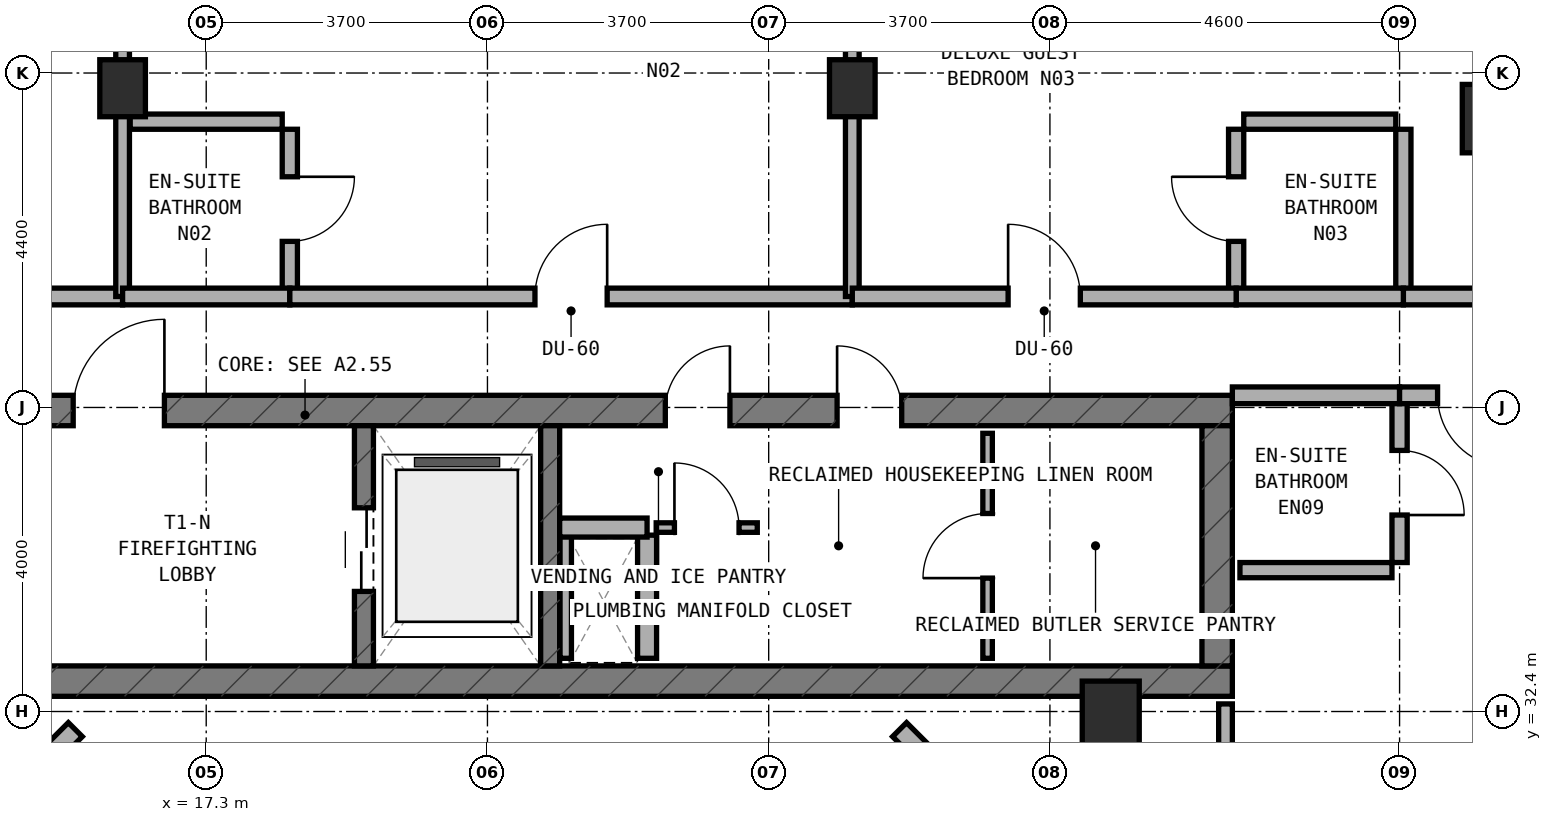
"""IFC4 building model, lengths in metres.
Left out: names, types, materials, properties, quantities, classifications, styles, units other than length and angle.
Written with IfcOpenShell. Run it as: python <this file> out.ifc"""

import sys

from ifc_helpers import new_model, si_unit, direction, frame, frame_2d, origin, origin_2d, place, context, subcontext, project, spatial, rectangle, extrude, element, fill, save


model = new_model("IFC4")
c1 = context("Model", 3, precision=1e-05, world=origin(), true_north=direction((0.0, 1.0)))
c2 = subcontext(c1, "Body", "Model", "MODEL_VIEW")
j1 = project(units=[si_unit("LENGTHUNIT", "METRE"), si_unit("PLANEANGLEUNIT", "RADIAN")], contexts=[c1])
p1 = place(None, origin())
s1 = spatial("IfcSite", under=j1, at=p1, CompositionType="ELEMENT")
p2 = place(p1, origin())
s2 = spatial("IfcBuilding", under=s1, at=p2, CompositionType="ELEMENT")
p3 = place(p2, frame((0.0, 0.0, 254.0)))
s3 = spatial("IfcBuildingStorey", under=s2, at=p3, CompositionType="ELEMENT", Elevation=254.0)
p4 = place(p3, frame((6.4, 32.8, 0.0), z_axis=(0.0, 0.0, 1.0), x_axis=(1.0, 0.0, 0.0)))
e1 = element("IfcWall", 1, at=p4, inside=s3, PredefinedType="SHEAR", context=c2, shape_type="SweptSolid", body=[
    extrude(rectangle(XDim=24.4, YDim=0.4, at=frame_2d((12.2, 0.0))), origin(), (0.0, 0.0, 1.0), 3.6),
])
p5 = place(p4, frame((6.05, 0.0, 0.0)))
e2 = element("IfcOpeningElement", 2, at=p5, cuts=e1, PredefinedType="OPENING", context=c2, shape_type="SweptSolid", body=[
    extrude(rectangle(XDim=1.1, YDim=2.15, at=frame_2d((0.55, 1.075))), frame((0.0, 0.21, 0.0), z_axis=(0.0, -1.0, 0.0), x_axis=(1.0, 0.0, 0.0)), (0.0, 0.0, 1.0), 0.42),
])
p6 = place(p3, frame((6.4, 36.36, 0.0), z_axis=(0.0, 0.0, 1.0), x_axis=(1.0, 0.0, 0.0)))
e3 = element("IfcWall", 3, at=p6, inside=s3, PredefinedType="SHEAR", context=c2, shape_type="SweptSolid", body=[
    extrude(rectangle(XDim=24.4, YDim=0.4, at=frame_2d((12.2, 0.0))), origin(), (0.0, 0.0, 1.0), 3.6),
])
p7 = place(p6, frame((9.15, 0.0, 0.0)))
e4 = element("IfcOpeningElement", 4, at=p7, cuts=e3, PredefinedType="OPENING", context=c2, shape_type="SweptSolid", body=[
    extrude(rectangle(XDim=1.2, YDim=2.15, at=frame_2d((0.6, 1.075))), frame((0.0, 0.21, 0.0), z_axis=(0.0, -1.0, 0.0), x_axis=(1.0, 0.0, 0.0)), (0.0, 0.0, 1.0), 0.42),
])
p8 = place(p6, frame((19.2, 0.0, 0.0)))
e5 = element("IfcOpeningElement", 5, at=p8, cuts=e3, PredefinedType="OPENING", context=c2, shape_type="SweptSolid", body=[
    extrude(rectangle(XDim=0.85, YDim=2.1, at=frame_2d((0.425, 1.05))), frame((0.0, 0.21, 0.0), z_axis=(0.0, -1.0, 0.0), x_axis=(1.0, 0.0, 0.0)), (0.0, 0.0, 1.0), 0.42),
])
p9 = place(p6, frame((16.94, 0.0, 0.0)))
e6 = element("IfcOpeningElement", 6, at=p9, cuts=e3, PredefinedType="OPENING", context=c2, shape_type="SweptSolid", body=[
    extrude(rectangle(XDim=0.85, YDim=2.1, at=frame_2d((0.425, 1.05))), frame((0.0, 0.21, 0.0), z_axis=(0.0, -1.0, 0.0), x_axis=(1.0, 0.0, 0.0)), (0.0, 0.0, 1.0), 0.42),
])
p10 = place(p3, frame((30.6, 33.0, 0.0), z_axis=(0.0, 0.0, 1.0), x_axis=(0.0, 1.0, 0.0)))
e7 = element("IfcWall", 7, at=p10, inside=s3, PredefinedType="SHEAR", context=c2, shape_type="SweptSolid", body=[
    extrude(rectangle(XDim=3.16, YDim=0.4, at=frame_2d((1.58, 0.0))), origin(), (0.0, 0.0, 1.0), 3.6),
])
p11 = place(p3, frame((19.375, 33.0, 0.0), z_axis=(0.0, 0.0, 1.0), x_axis=(0.0, 1.0, 0.0)))
e8 = element("IfcWall", 8, at=p11, inside=s3, PredefinedType="STANDARD", context=c2, shape_type="SweptSolid", body=[
    extrude(rectangle(XDim=3.16, YDim=0.25, at=frame_2d((1.58, 0.0))), origin(), (0.0, 0.0, 1.0), 3.32),
])
p12 = place(p11, frame((0.98, 0.0, 0.0)))
e9 = element("IfcOpeningElement", 9, at=p12, cuts=e8, PredefinedType="OPENING", context=c2, shape_type="SweptSolid", body=[
    extrude(rectangle(XDim=1.1, YDim=2.15, at=frame_2d((0.55, 1.075))), frame((0.0, 0.135, 0.0), z_axis=(0.0, -1.0, 0.0), x_axis=(1.0, 0.0, 0.0)), (0.0, 0.0, 1.0), 0.27),
])
p13 = place(p3, frame((21.825, 33.0, 0.0), z_axis=(0.0, 0.0, 1.0), x_axis=(0.0, 1.0, 0.0)))
e10 = element("IfcWall", 10, at=p13, inside=s3, PredefinedType="STANDARD", context=c2, shape_type="SweptSolid", body=[
    extrude(rectangle(XDim=3.16, YDim=0.25, at=frame_2d((1.58, 0.0))), origin(), (0.0, 0.0, 1.0), 3.32),
])
for number, where, z_axis, x_axis in (
    (11, (16.2, 40.6, 0.0), (0.0, 0.0, 1.0), (1.0, 0.0, 0.0)),
    (12, (25.8, 40.6, 0.0), (0.0, 0.0, 1.0), (1.0, 0.0, 0.0)),
):
    element("IfcColumn", number, at=place(p3, frame(where, z_axis=z_axis, x_axis=x_axis)), inside=s3, PredefinedType="COLUMN", context=c2, shape_type="SweptSolid", body=[
        extrude(rectangle(XDim=0.6, YDim=0.75, at=origin_2d()), origin(), (0.0, 0.0, 1.0), 3.6),
    ])
for number, where, z_axis, x_axis in (
    (13, (34.2, 40.2, 0.0), (0.0, 0.0, 1.0), (1.0, 0.0, 0.0)),
    (14, (29.2, 32.35, 0.0), (0.0, 0.0, 1.0), (1.0, 0.0, 0.0)),
):
    element("IfcColumn", number, at=place(p3, frame(where, z_axis=z_axis, x_axis=x_axis)), inside=s3, PredefinedType="COLUMN", context=c2, shape_type="SweptSolid", body=[
        extrude(rectangle(XDim=0.75, YDim=0.9, at=origin_2d()), origin(), (0.0, 0.0, 1.0), 3.6),
    ])
for number, where, z_axis, x_axis in (
    (15, (28.056, 30.528, 0.0), (0.0, 0.0, 1.0), (-0.707, 0.707, 0.0)),
    (16, (15.578, 32.162, 0.0), (0.0, 0.0, 1.0), (-0.707, -0.707, 0.0)),
):
    element("IfcWall", number, at=place(p3, frame(where, z_axis=z_axis, x_axis=x_axis)), inside=s3, PredefinedType="STANDARD", context=c2, shape_type="SweptSolid", body=[
        extrude(rectangle(XDim=2.311, YDim=0.26, at=frame_2d((1.155, 0.0))), origin(), (0.0, 0.0, 1.0), 3.32),
    ])
p14 = place(p3, frame((27.58, 33.1, 0.0), z_axis=(0.0, 0.0, 1.0), x_axis=(0.0, 1.0, 0.0)))
e17 = element("IfcWall", 17, at=p14, inside=s3, PredefinedType="PARTITIONING", context=c2, shape_type="SweptSolid", body=[
    extrude(rectangle(XDim=2.96, YDim=0.125, at=frame_2d((1.48, 0.0))), origin(), (0.0, 0.0, 1.0), 3.32),
])
p15 = place(p14, frame((1.055, 0.0, 0.0)))
e18 = element("IfcOpeningElement", 18, at=p15, cuts=e17, PredefinedType="OPENING", context=c2, shape_type="SweptSolid", body=[
    extrude(rectangle(XDim=0.85, YDim=2.1, at=frame_2d((0.425, 1.05))), frame((0.0, 0.073, 0.0), z_axis=(0.0, -1.0, 0.0), x_axis=(1.0, 0.0, 0.0)), (0.0, 0.0, 1.0), 0.145),
])
p16 = place(p3, frame((22.03, 33.1, 0.0), z_axis=(0.0, 0.0, 1.0), x_axis=(0.0, 1.0, 0.0)))
e19 = element("IfcWall", 19, at=p16, inside=s3, PredefinedType="PARTITIONING", context=c2, shape_type="SweptSolid", body=[
    extrude(rectangle(XDim=1.62, YDim=0.15, at=frame_2d((0.81, 0.0))), origin(), (0.0, 0.0, 1.0), 3.32),
])
p17 = place(p3, frame((23.1, 33.1, 0.0), z_axis=(0.0, 0.0, 1.0), x_axis=(0.0, 1.0, 0.0)))
e20 = element("IfcWall", 20, at=p17, inside=s3, PredefinedType="SOLIDWALL", context=c2, shape_type="SweptSolid", body=[
    extrude(rectangle(XDim=1.62, YDim=0.25, at=frame_2d((0.81, 0.0))), origin(), (0.0, 0.0, 1.0), 3.32),
])
p18 = place(p3, frame((21.95, 34.82, 0.0), z_axis=(0.0, 0.0, 1.0), x_axis=(1.0, 0.0, 0.0)))
e21 = element("IfcWall", 21, at=p18, inside=s3, PredefinedType="SOLIDWALL", context=c2, shape_type="SweptSolid", body=[
    extrude(rectangle(XDim=1.15, YDim=0.25, at=frame_2d((0.575, 0.0))), origin(), (0.0, 0.0, 1.0), 3.32),
])
p19 = place(p3, frame((23.22, 34.82, 0.0), z_axis=(0.0, 0.0, 1.0), x_axis=(1.0, 0.0, 0.0)))
e22 = element("IfcWall", 22, at=p19, inside=s3, PredefinedType="PARTITIONING", context=c2, shape_type="SweptSolid", body=[
    extrude(rectangle(XDim=1.33, YDim=0.125, at=frame_2d((0.665, 0.0))), origin(), (0.0, 0.0, 1.0), 3.32),
])
p20 = place(p19, frame((0.24, 0.0, 0.0)))
e23 = element("IfcOpeningElement", 23, at=p20, cuts=e22, PredefinedType="OPENING", context=c2, shape_type="SweptSolid", body=[
    extrude(rectangle(XDim=0.85, YDim=2.1, at=frame_2d((0.425, 1.05))), frame((0.0, 0.073, 0.0), z_axis=(0.0, -1.0, 0.0), x_axis=(1.0, 0.0, 0.0)), (0.0, 0.0, 1.0), 0.145),
])
p21 = place(p3, frame((11.15, 37.86, 0.0), z_axis=(0.0, 0.0, 1.0), x_axis=(1.0, 0.0, 0.0)))
e24 = element("IfcWall", 24, at=p21, inside=s3, PredefinedType="SOLIDWALL", context=c2, shape_type="SweptSolid", body=[
    extrude(rectangle(XDim=5.05, YDim=0.22, at=frame_2d((2.525, 0.0))), origin(), (0.0, 0.0, 1.0), 2.745),
])
p22 = place(p21, frame((2.05, 0.0, 0.0)))
e25 = element("IfcOpeningElement", 25, at=p22, cuts=e24, PredefinedType="OPENING", context=c2, shape_type="SweptSolid", body=[
    extrude(rectangle(XDim=0.95, YDim=2.1, at=frame_2d((0.475, 1.05))), frame((0.0, 0.12, 0.0), z_axis=(0.0, -1.0, 0.0), x_axis=(1.0, 0.0, 0.0)), (0.0, 0.0, 1.0), 0.24),
])
p23 = place(p3, frame((16.2, 37.86, 0.0), z_axis=(0.0, 0.0, 1.0), x_axis=(0.0, 1.0, 0.0)))
e26 = element("IfcWall", 26, at=p23, inside=s3, PredefinedType="SOLIDWALL", context=c2, shape_type="SweptSolid", body=[
    extrude(rectangle(XDim=5.28, YDim=0.18, at=frame_2d((2.64, 0.0))), origin(), (0.0, 0.0, 1.0), 2.745),
])
p24 = place(p3, frame((18.4, 37.96, 0.0), z_axis=(0.0, 0.0, 1.0), x_axis=(0.0, 1.0, 0.0)))
e27 = element("IfcWall", 27, at=p24, inside=s3, PredefinedType="PLUMBINGWALL", context=c2, shape_type="SweptSolid", body=[
    extrude(rectangle(XDim=2.1, YDim=0.2, at=frame_2d((1.05, 0.0))), origin(), (0.0, 0.0, 1.0), 2.845),
])
p25 = place(p24, frame((0.625, 0.0, 0.0)))
e28 = element("IfcOpeningElement", 28, at=p25, cuts=e27, PredefinedType="OPENING", context=c2, shape_type="SweptSolid", body=[
    extrude(rectangle(XDim=0.85, YDim=2.1, at=frame_2d((0.425, 1.05))), frame((0.0, 0.11, 0.0), z_axis=(0.0, -1.0, 0.0), x_axis=(1.0, 0.0, 0.0)), (0.0, 0.0, 1.0), 0.22),
])
p26 = place(p3, frame((16.3, 40.16, 0.0), z_axis=(0.0, 0.0, 1.0), x_axis=(1.0, 0.0, 0.0)))
e29 = element("IfcWall", 29, at=p26, inside=s3, PredefinedType="PLUMBINGWALL", context=c2, shape_type="SweptSolid", body=[
    extrude(rectangle(XDim=2.0, YDim=0.2, at=frame_2d((1.0, 0.0))), origin(), (0.0, 0.0, 1.0), 3.32),
])
p27 = place(p3, frame((16.2, 37.86, 0.0), z_axis=(0.0, 0.0, 1.0), x_axis=(1.0, 0.0, 0.0)))
e30 = element("IfcWall", 30, at=p27, inside=s3, PredefinedType="SOLIDWALL", context=c2, shape_type="SweptSolid", body=[
    extrude(rectangle(XDim=2.2, YDim=0.22, at=frame_2d((1.1, 0.0))), origin(), (0.0, 0.0, 1.0), 2.745),
])
p28 = place(p3, frame((18.4, 37.86, 0.0), z_axis=(0.0, 0.0, 1.0), x_axis=(1.0, 0.0, 0.0)))
e31 = element("IfcWall", 31, at=p28, inside=s3, PredefinedType="SOLIDWALL", context=c2, shape_type="SweptSolid", body=[
    extrude(rectangle(XDim=7.4, YDim=0.22, at=frame_2d((3.7, 0.0))), origin(), (0.0, 0.0, 1.0), 2.745),
])
p29 = place(p28, frame((3.225, 0.0, 0.0)))
e32 = element("IfcOpeningElement", 32, at=p29, cuts=e31, PredefinedType="OPENING", context=c2, shape_type="SweptSolid", body=[
    extrude(rectangle(XDim=0.95, YDim=2.1, at=frame_2d((0.475, 1.05))), frame((0.0, 0.12, 0.0), z_axis=(0.0, -1.0, 0.0), x_axis=(1.0, 0.0, 0.0)), (0.0, 0.0, 1.0), 0.24),
])
p30 = place(p3, frame((25.8, 37.86, 0.0), z_axis=(0.0, 0.0, 1.0), x_axis=(0.0, 1.0, 0.0)))
e33 = element("IfcWall", 33, at=p30, inside=s3, PredefinedType="SOLIDWALL", context=c2, shape_type="SweptSolid", body=[
    extrude(rectangle(XDim=5.28, YDim=0.18, at=frame_2d((2.64, 0.0))), origin(), (0.0, 0.0, 1.0), 2.745),
])
p31 = place(p3, frame((30.85, 37.96, 0.0), z_axis=(0.0, 0.0, 1.0), x_axis=(0.0, 1.0, 0.0)))
e34 = element("IfcWall", 34, at=p31, inside=s3, PredefinedType="PLUMBINGWALL", context=c2, shape_type="SweptSolid", body=[
    extrude(rectangle(XDim=2.1, YDim=0.2, at=frame_2d((1.05, 0.0))), origin(), (0.0, 0.0, 1.0), 2.845),
])
p32 = place(p31, frame((0.625, 0.0, 0.0)))
e35 = element("IfcOpeningElement", 35, at=p32, cuts=e34, PredefinedType="OPENING", context=c2, shape_type="SweptSolid", body=[
    extrude(rectangle(XDim=0.85, YDim=2.1, at=frame_2d((0.425, 1.05))), frame((0.0, 0.11, 0.0), z_axis=(0.0, -1.0, 0.0), x_axis=(1.0, 0.0, 0.0)), (0.0, 0.0, 1.0), 0.22),
])
p33 = place(p3, frame((30.95, 40.16, 0.0), z_axis=(0.0, 0.0, 1.0), x_axis=(1.0, 0.0, 0.0)))
e36 = element("IfcWall", 36, at=p33, inside=s3, PredefinedType="PLUMBINGWALL", context=c2, shape_type="SweptSolid", body=[
    extrude(rectangle(XDim=2.0, YDim=0.2, at=frame_2d((1.0, 0.0))), origin(), (0.0, 0.0, 1.0), 3.015),
])
p34 = place(p3, frame((33.05, 37.96, 0.0), z_axis=(0.0, 0.0, 1.0), x_axis=(0.0, 1.0, 0.0)))
e37 = element("IfcWall", 37, at=p34, inside=s3, PredefinedType="PLUMBINGWALL", context=c2, shape_type="SweptSolid", body=[
    extrude(rectangle(XDim=2.1, YDim=0.2, at=frame_2d((1.05, 0.0))), origin(), (0.0, 0.0, 1.0), 2.845),
])
p35 = place(p3, frame((33.05, 37.86, 0.0), z_axis=(0.0, 0.0, 1.0), x_axis=(1.0, 0.0, 0.0)))
e38 = element("IfcWall", 38, at=p35, inside=s3, PredefinedType="SOLIDWALL", context=c2, shape_type="SweptSolid", body=[
    extrude(rectangle(XDim=5.59, YDim=0.22, at=frame_2d((2.795, 0.0))), origin(), (0.0, 0.0, 1.0), 2.745),
])
p36 = place(p3, frame((30.85, 37.86, 0.0), z_axis=(0.0, 0.0, 1.0), x_axis=(1.0, 0.0, 0.0)))
e39 = element("IfcWall", 39, at=p36, inside=s3, PredefinedType="SOLIDWALL", context=c2, shape_type="SweptSolid", body=[
    extrude(rectangle(XDim=2.2, YDim=0.22, at=frame_2d((1.1, 0.0))), origin(), (0.0, 0.0, 1.0), 3.32),
])
p37 = place(p3, frame((25.8, 37.86, 0.0), z_axis=(0.0, 0.0, 1.0), x_axis=(1.0, 0.0, 0.0)))
e40 = element("IfcWall", 40, at=p37, inside=s3, PredefinedType="SOLIDWALL", context=c2, shape_type="SweptSolid", body=[
    extrude(rectangle(XDim=5.05, YDim=0.22, at=frame_2d((2.525, 0.0))), origin(), (0.0, 0.0, 1.0), 2.745),
])
p38 = place(p37, frame((2.05, 0.0, 0.0)))
e41 = element("IfcOpeningElement", 41, at=p38, cuts=e40, PredefinedType="OPENING", context=c2, shape_type="SweptSolid", body=[
    extrude(rectangle(XDim=0.95, YDim=2.1, at=frame_2d((0.475, 1.05))), frame((0.0, 0.12, 0.0), z_axis=(0.0, -1.0, 0.0), x_axis=(1.0, 0.0, 0.0)), (0.0, 0.0, 1.0), 0.24),
])
p39 = place(p3, frame((30.71, 17.5, 0.0), z_axis=(0.0, 0.0, 1.0), x_axis=(0.0, 1.0, 0.0)))
e42 = element("IfcWall", 42, at=p39, inside=s3, PredefinedType="SOLIDWALL", context=c2, shape_type="SweptSolid", body=[
    extrude(rectangle(XDim=15.0, YDim=0.18, at=frame_2d((7.5, 0.0))), origin(), (0.0, 0.0, 1.0), 2.745),
])
p40 = place(p3, frame((33.0, 34.36, 0.0), z_axis=(0.0, 0.0, 1.0), x_axis=(0.0, 1.0, 0.0)))
e43 = element("IfcWall", 43, at=p40, inside=s3, PredefinedType="PLUMBINGWALL", context=c2, shape_type="SweptSolid", body=[
    extrude(rectangle(XDim=2.1, YDim=0.2, at=frame_2d((1.05, 0.0))), origin(), (0.0, 0.0, 1.0), 3.32),
])
p41 = place(p40, frame((0.625, 0.0, 0.0)))
e44 = element("IfcOpeningElement", 44, at=p41, cuts=e43, PredefinedType="OPENING", context=c2, shape_type="SweptSolid", body=[
    extrude(rectangle(XDim=0.85, YDim=2.1, at=frame_2d((0.425, 1.05))), frame((0.0, 0.11, 0.0), z_axis=(0.0, -1.0, 0.0), x_axis=(1.0, 0.0, 0.0)), (0.0, 0.0, 1.0), 0.22),
])
p42 = place(p3, frame((30.9, 34.26, 0.0), z_axis=(0.0, 0.0, 1.0), x_axis=(1.0, 0.0, 0.0)))
e45 = element("IfcWall", 45, at=p42, inside=s3, PredefinedType="PLUMBINGWALL", context=c2, shape_type="SweptSolid", body=[
    extrude(rectangle(XDim=2.0, YDim=0.2, at=frame_2d((1.0, 0.0))), origin(), (0.0, 0.0, 1.0), 3.32),
])
p43 = place(p3, frame((30.8, 36.56, 0.0), z_axis=(0.0, 0.0, 1.0), x_axis=(1.0, 0.0, 0.0)))
e46 = element("IfcWall", 46, at=p43, inside=s3, PredefinedType="SOLIDWALL", context=c2, shape_type="SweptSolid", body=[
    extrude(rectangle(XDim=2.2, YDim=0.22, at=frame_2d((1.1, 0.0))), origin(), (0.0, 0.0, 1.0), 3.32),
])
p44 = place(p3, frame((33.0, 36.56, 0.0), z_axis=(0.0, 0.0, 1.0), x_axis=(1.0, 0.0, 0.0)))
e47 = element("IfcWall", 47, at=p44, inside=s3, PredefinedType="SOLIDWALL", context=c2, shape_type="SweptSolid", body=[
    extrude(rectangle(XDim=5.8, YDim=0.22, at=frame_2d((2.9, 0.0))), origin(), (0.0, 0.0, 1.0), 2.745),
])
p45 = place(p44, frame((0.5, 0.0, 0.0)))
e48 = element("IfcOpeningElement", 48, at=p45, cuts=e47, PredefinedType="OPENING", context=c2, shape_type="SweptSolid", body=[
    extrude(rectangle(XDim=0.95, YDim=2.1, at=frame_2d((0.475, 1.05))), frame((0.0, 0.12, 0.0), z_axis=(0.0, -1.0, 0.0), x_axis=(1.0, 0.0, 0.0)), (0.0, 0.0, 1.0), 0.24),
])
p46 = place(p7, origin())
e49 = element("IfcDoor", 49, at=p46, inside=s3, OperationType="SINGLE_SWING_RIGHT", PredefinedType="DOOR", context=c2, shape_type="SweptSolid", body=[
    extrude(rectangle(XDim=1.2, YDim=2.15, at=frame_2d((0.6, 1.075))), frame((0.0, 0.025, 0.0), z_axis=(0.0, -1.0, 0.0), x_axis=(1.0, 0.0, 0.0)), (0.0, 0.0, 1.0), 0.05),
])
fill(e4, e49)
p47 = place(p12, origin())
e50 = element("IfcDoor", 50, at=p47, inside=s3, OperationType="DOUBLE_DOOR_SLIDING", PredefinedType="DOOR", context=c2, shape_type="SweptSolid", body=[
    extrude(rectangle(XDim=1.1, YDim=2.15, at=frame_2d((0.55, 1.075))), frame((0.0, 0.025, 0.0), z_axis=(0.0, -1.0, 0.0), x_axis=(1.0, 0.0, 0.0)), (0.0, 0.0, 1.0), 0.05),
])
fill(e9, e50)
p48 = place(p8, origin())
e51 = element("IfcDoor", 51, at=p48, inside=s3, OperationType="SINGLE_SWING_LEFT", PredefinedType="DOOR", context=c2, shape_type="SweptSolid", body=[
    extrude(rectangle(XDim=0.85, YDim=2.1, at=frame_2d((0.425, 1.05))), frame((0.0, 0.025, 0.0), z_axis=(0.0, -1.0, 0.0), x_axis=(1.0, 0.0, 0.0)), (0.0, 0.0, 1.0), 0.05),
])
fill(e5, e51)
p49 = place(p9, origin())
e52 = element("IfcDoor", 52, at=p49, inside=s3, OperationType="SINGLE_SWING_RIGHT", PredefinedType="DOOR", context=c2, shape_type="SweptSolid", body=[
    extrude(rectangle(XDim=0.85, YDim=2.1, at=frame_2d((0.425, 1.05))), frame((0.0, 0.025, 0.0), z_axis=(0.0, -1.0, 0.0), x_axis=(1.0, 0.0, 0.0)), (0.0, 0.0, 1.0), 0.05),
])
fill(e6, e52)
p50 = place(p15, origin())
e53 = element("IfcDoor", 53, at=p50, inside=s3, OperationType="SINGLE_SWING_LEFT", PredefinedType="DOOR", context=c2, shape_type="SweptSolid", body=[
    extrude(rectangle(XDim=0.85, YDim=2.1, at=frame_2d((0.425, 1.05))), frame((0.0, 0.025, 0.0), z_axis=(0.0, -1.0, 0.0), x_axis=(1.0, 0.0, 0.0)), (0.0, 0.0, 1.0), 0.05),
])
fill(e18, e53)
p51 = place(p20, origin())
e54 = element("IfcDoor", 54, at=p51, inside=s3, OperationType="SINGLE_SWING_LEFT", PredefinedType="DOOR", context=c2, shape_type="SweptSolid", body=[
    extrude(rectangle(XDim=0.85, YDim=2.1, at=frame_2d((0.425, 1.05))), frame((0.0, 0.025, 0.0), z_axis=(0.0, -1.0, 0.0), x_axis=(1.0, 0.0, 0.0)), (0.0, 0.0, 1.0), 0.05),
])
fill(e23, e54)
p52 = place(p25, frame((0.85, 0.0, 0.0), z_axis=(0.0, 0.0, 1.0), x_axis=(-1.0, 0.0, 0.0)))
e55 = element("IfcDoor", 55, at=p52, inside=s3, OperationType="SINGLE_SWING_LEFT", PredefinedType="DOOR", context=c2, shape_type="SweptSolid", body=[
    extrude(rectangle(XDim=0.85, YDim=2.1, at=frame_2d((0.425, 1.05))), frame((0.0, 0.025, 0.0), z_axis=(0.0, -1.0, 0.0), x_axis=(1.0, 0.0, 0.0)), (0.0, 0.0, 1.0), 0.05),
])
fill(e28, e55)
p53 = place(p29, origin())
e56 = element("IfcDoor", 56, at=p53, inside=s3, OperationType="SINGLE_SWING_RIGHT", PredefinedType="DOOR", context=c2, shape_type="SweptSolid", body=[
    extrude(rectangle(XDim=0.95, YDim=2.1, at=frame_2d((0.475, 1.05))), frame((0.0, 0.025, 0.0), z_axis=(0.0, -1.0, 0.0), x_axis=(1.0, 0.0, 0.0)), (0.0, 0.0, 1.0), 0.05),
])
fill(e32, e56)
p54 = place(p32, origin())
e57 = element("IfcDoor", 57, at=p54, inside=s3, OperationType="SINGLE_SWING_RIGHT", PredefinedType="DOOR", context=c2, shape_type="SweptSolid", body=[
    extrude(rectangle(XDim=0.85, YDim=2.1, at=frame_2d((0.425, 1.05))), frame((0.0, 0.025, 0.0), z_axis=(0.0, -1.0, 0.0), x_axis=(1.0, 0.0, 0.0)), (0.0, 0.0, 1.0), 0.05),
])
fill(e35, e57)
p55 = place(p38, origin())
e58 = element("IfcDoor", 58, at=p55, inside=s3, OperationType="SINGLE_SWING_LEFT", PredefinedType="DOOR", context=c2, shape_type="SweptSolid", body=[
    extrude(rectangle(XDim=0.95, YDim=2.1, at=frame_2d((0.475, 1.05))), frame((0.0, 0.025, 0.0), z_axis=(0.0, -1.0, 0.0), x_axis=(1.0, 0.0, 0.0)), (0.0, 0.0, 1.0), 0.05),
])
fill(e41, e58)
p56 = place(p41, frame((0.85, 0.0, 0.0), z_axis=(0.0, 0.0, 1.0), x_axis=(-1.0, 0.0, 0.0)))
e59 = element("IfcDoor", 59, at=p56, inside=s3, OperationType="SINGLE_SWING_RIGHT", PredefinedType="DOOR", context=c2, shape_type="SweptSolid", body=[
    extrude(rectangle(XDim=0.85, YDim=2.1, at=frame_2d((0.425, 1.05))), frame((0.0, 0.025, 0.0), z_axis=(0.0, -1.0, 0.0), x_axis=(1.0, 0.0, 0.0)), (0.0, 0.0, 1.0), 0.05),
])
fill(e44, e59)
p57 = place(p45, frame((0.95, 0.0, 0.0), z_axis=(0.0, 0.0, 1.0), x_axis=(-1.0, 0.0, 0.0)))
e60 = element("IfcDoor", 60, at=p57, inside=s3, OperationType="SINGLE_SWING_LEFT", PredefinedType="DOOR", context=c2, shape_type="SweptSolid", body=[
    extrude(rectangle(XDim=0.95, YDim=2.1, at=frame_2d((0.475, 1.05))), frame((0.0, 0.025, 0.0), z_axis=(0.0, -1.0, 0.0), x_axis=(1.0, 0.0, 0.0)), (0.0, 0.0, 1.0), 0.05),
])
fill(e48, e60)
save(model, sys.argv[1])
